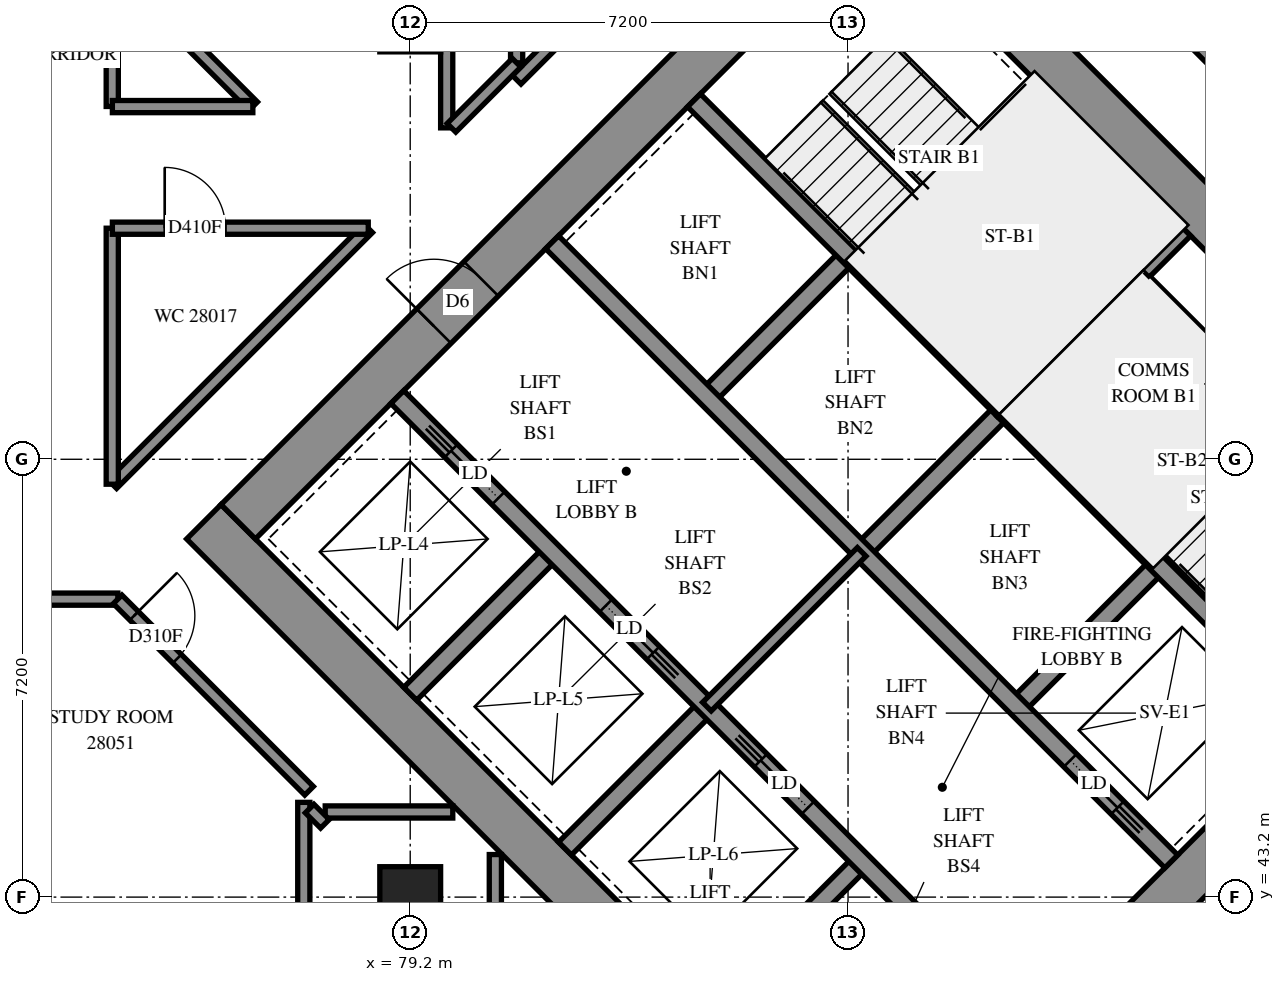
"""IFC4 building model, lengths in metres.
Left out: names, types, materials, properties, quantities, classifications, styles, units other than length and angle.
Written with IfcOpenShell. Run it as: python <this file> out.ifc"""

import sys

from ifc_helpers import new_model, si_unit, direction, frame, frame_2d, origin, origin_2d, place, context, subcontext, project, spatial, rectangle, extrude, element, fill, save


model = new_model("IFC4")
c1 = context("Model", 3, precision=1e-05, world=origin(), true_north=direction((0.0, 1.0)))
c2 = subcontext(c1, "Body", "Model", "MODEL_VIEW")
j1 = project(units=[si_unit("LENGTHUNIT", "METRE"), si_unit("PLANEANGLEUNIT", "RADIAN")], contexts=[c1])
p1 = place(None, origin())
s1 = spatial("IfcSite", under=j1, at=p1, CompositionType="ELEMENT")
p2 = place(p1, origin())
s2 = spatial("IfcBuilding", under=s1, at=p2, CompositionType="ELEMENT")
p3 = place(p2, frame((0.0, 0.0, 105.0)))
s3 = spatial("IfcBuildingStorey", under=s2, at=p3, CompositionType="ELEMENT", Elevation=105.0)
p4 = place(p3, frame((79.2, 43.2, 0.0), z_axis=(0.0, 0.0, 1.0), x_axis=(1.0, 0.0, 0.0)))
e1 = element("IfcColumn", 1, at=p4, inside=s3, PredefinedType="COLUMN", context=c2, shape_type="SweptSolid", body=[
    extrude(rectangle(XDim=1.0, YDim=1.0, at=origin_2d()), origin(), (0.0, 0.0, 1.0), 3.1),
])
p5 = place(p3, frame((75.806, 49.373, -0.3), z_axis=(0.0, 0.0, 1.0), x_axis=(0.7071067812, -0.7071067812, 0.0)))
e2 = element("IfcWall", 2, at=p5, inside=s3, PredefinedType="SHEAR", context=c2, shape_type="SweptSolid", body=[
    extrude(rectangle(XDim=16.0, YDim=0.8, at=frame_2d((8.0, 0.0))), origin(), (0.0, 0.0, 1.0), 2.7),
])
p6 = place(p3, frame((86.554, 60.121, -0.3), z_axis=(0.0, 0.0, 1.0), x_axis=(0.7071067812, -0.7071067812, 0.0)))
e3 = element("IfcWall", 3, at=p6, inside=s3, PredefinedType="SHEAR", context=c2, shape_type="SweptSolid", body=[
    extrude(rectangle(XDim=16.0, YDim=0.8, at=frame_2d((8.0, 0.0))), origin(), (0.0, 0.0, 1.0), 2.7),
])
p7 = place(p6, frame((10.8, 0.0, 0.3)))
e4 = element("IfcOpeningElement", 4, at=p7, cuts=e3, PredefinedType="OPENING", context=c2, shape_type="SweptSolid", body=[
    extrude(rectangle(XDim=0.8, YDim=2.1, at=frame_2d((0.4, 1.05))), frame((0.0, 0.41, 0.0), z_axis=(0.0, -1.0, 0.0), x_axis=(1.0, 0.0, 0.0)), (0.0, 0.0, 1.0), 0.82),
])
p8 = place(p3, frame((76.372, 49.373, -0.3), z_axis=(0.0, 0.0, 1.0), x_axis=(0.7071067812, 0.7071067812, 0.0)))
e5 = element("IfcWall", 5, at=p8, inside=s3, PredefinedType="SHEAR", context=c2, shape_type="SweptSolid", body=[
    extrude(rectangle(XDim=14.4, YDim=0.8, at=frame_2d((7.2, 0.0))), origin(), (0.0, 0.0, 1.0), 2.7),
])
p9 = place(p8, frame((4.55, 0.0, 0.3)))
e6 = element("IfcOpeningElement", 6, at=p9, cuts=e5, PredefinedType="OPENING", context=c2, shape_type="SweptSolid", body=[
    extrude(rectangle(XDim=1.1, YDim=2.1, at=frame_2d((0.55, 1.05))), frame((0.0, 0.41, 0.0), z_axis=(0.0, -1.0, 0.0), x_axis=(1.0, 0.0, 0.0)), (0.0, 0.0, 1.0), 0.82),
])
p10 = place(p8, frame((11.35, 0.0, 0.3)))
e7 = element("IfcOpeningElement", 7, at=p10, cuts=e5, PredefinedType="OPENING", context=c2, shape_type="SweptSolid", body=[
    extrude(rectangle(XDim=1.1, YDim=2.1, at=frame_2d((0.55, 1.05))), frame((0.0, 0.41, 0.0), z_axis=(0.0, -1.0, 0.0), x_axis=(1.0, 0.0, 0.0)), (0.0, 0.0, 1.0), 0.82),
])
p11 = place(p3, frame((87.12, 38.625, -0.3), z_axis=(0.0, 0.0, 1.0), x_axis=(0.7071067812, 0.7071067812, 0.0)))
e8 = element("IfcWall", 8, at=p11, inside=s3, PredefinedType="SHEAR", context=c2, shape_type="SweptSolid", body=[
    extrude(rectangle(XDim=14.4, YDim=0.8, at=frame_2d((7.2, 0.0))), origin(), (0.0, 0.0, 1.0), 2.7),
])
p12 = place(p11, frame((4.55, 0.0, 0.3)))
e9 = element("IfcOpeningElement", 9, at=p12, cuts=e8, PredefinedType="OPENING", context=c2, shape_type="SweptSolid", body=[
    extrude(rectangle(XDim=1.1, YDim=2.1, at=frame_2d((0.55, 1.05))), frame((0.0, 0.41, 0.0), z_axis=(0.0, -1.0, 0.0), x_axis=(1.0, 0.0, 0.0)), (0.0, 0.0, 1.0), 0.82),
])
p13 = place(p11, frame((11.35, 0.0, 0.3)))
e10 = element("IfcOpeningElement", 10, at=p13, cuts=e8, PredefinedType="OPENING", context=c2, shape_type="SweptSolid", body=[
    extrude(rectangle(XDim=1.1, YDim=2.1, at=frame_2d((0.55, 1.05))), frame((0.0, 0.41, 0.0), z_axis=(0.0, -1.0, 0.0), x_axis=(1.0, 0.0, 0.0)), (0.0, 0.0, 1.0), 0.82),
])
for number, where, z_axis, x_axis in (
    (11, (79.2, 46.544, 0.0), (0.0, 0.0, 1.0), (0.707, 0.707, 0.0)),
    (12, (84.079, 51.423, 0.0), (0.0, 0.0, 1.0), (0.707, 0.707, 0.0)),
):
    element("IfcWall", number, at=place(p3, frame(where, z_axis=z_axis, x_axis=x_axis)), inside=s3, PredefinedType="SOLIDWALL", context=c2, shape_type="SweptSolid", body=[
        extrude(rectangle(XDim=3.3, YDim=0.3, at=frame_2d((1.65, 0.0))), origin(), (0.0, 0.0, 1.0), 3.1),
    ])
p14 = place(p3, frame((81.746, 43.999, 0.0), z_axis=(0.0, 0.0, 1.0), x_axis=(0.7071067812, 0.7071067812, 0.0)))
e13 = element("IfcWall", 13, at=p14, inside=s3, PredefinedType="SOLIDWALL", context=c2, shape_type="SweptSolid", body=[
    extrude(rectangle(XDim=3.3, YDim=0.3, at=frame_2d((1.65, 0.0))), origin(), (0.0, 0.0, 1.0), 3.1),
])
p15 = place(p3, frame((86.625, 48.878, 0.0), z_axis=(0.0, 0.0, 1.0), x_axis=(0.7071067812, 0.7071067812, 0.0)))
e14 = element("IfcWall", 14, at=p15, inside=s3, PredefinedType="SOLIDWALL", context=c2, shape_type="SweptSolid", body=[
    extrude(rectangle(XDim=3.3, YDim=0.3, at=frame_2d((1.65, 0.0))), origin(), (0.0, 0.0, 1.0), 3.1),
])
p16 = place(p3, frame((84.291, 41.453, 0.0), z_axis=(0.0, 0.0, 1.0), x_axis=(0.7071067812, 0.7071067812, 0.0)))
e15 = element("IfcWall", 15, at=p16, inside=s3, PredefinedType="SOLIDWALL", context=c2, shape_type="SweptSolid", body=[
    extrude(rectangle(XDim=3.3, YDim=0.3, at=frame_2d((1.65, 0.0))), origin(), (0.0, 0.0, 1.0), 3.1),
])
p17 = place(p3, frame((89.17, 46.332, 0.0), z_axis=(0.0, 0.0, 1.0), x_axis=(0.7071067812, 0.7071067812, 0.0)))
e16 = element("IfcWall", 16, at=p17, inside=s3, PredefinedType="SOLIDWALL", context=c2, shape_type="SweptSolid", body=[
    extrude(rectangle(XDim=3.3, YDim=0.3, at=frame_2d((1.65, 0.0))), origin(), (0.0, 0.0, 1.0), 3.1),
])
p18 = place(p3, frame((78.988, 51.423, 0.0), z_axis=(0.0, 0.0, 1.0), x_axis=(0.7071067812, -0.7071067812, 0.0)))
e17 = element("IfcWall", 17, at=p18, inside=s3, PredefinedType="SOLIDWALL", context=c2, shape_type="SweptSolid", body=[
    extrude(rectangle(XDim=14.4, YDim=0.3, at=frame_2d((7.2, 0.0))), origin(), (0.0, 0.0, 1.0), 3.1),
])
p19 = place(p18, frame((1.25, 0.0, 0.0)))
e18 = element("IfcOpeningElement", 18, at=p19, cuts=e17, PredefinedType="OPENING", context=c2, shape_type="SweptSolid", body=[
    extrude(rectangle(XDim=1.1, YDim=2.1, at=frame_2d((0.55, 1.05))), frame((0.0, 0.16, 0.0), z_axis=(0.0, -1.0, 0.0), x_axis=(1.0, 0.0, 0.0)), (0.0, 0.0, 1.0), 0.32),
])
p20 = place(p18, frame((4.85, 0.0, 0.0)))
e19 = element("IfcOpeningElement", 19, at=p20, cuts=e17, PredefinedType="OPENING", context=c2, shape_type="SweptSolid", body=[
    extrude(rectangle(XDim=1.1, YDim=2.1, at=frame_2d((0.55, 1.05))), frame((0.0, 0.16, 0.0), z_axis=(0.0, -1.0, 0.0), x_axis=(1.0, 0.0, 0.0)), (0.0, 0.0, 1.0), 0.32),
])
p21 = place(p18, frame((8.45, 0.0, 0.0)))
e20 = element("IfcOpeningElement", 20, at=p21, cuts=e17, PredefinedType="OPENING", context=c2, shape_type="SweptSolid", body=[
    extrude(rectangle(XDim=1.1, YDim=2.1, at=frame_2d((0.55, 1.05))), frame((0.0, 0.16, 0.0), z_axis=(0.0, -1.0, 0.0), x_axis=(1.0, 0.0, 0.0)), (0.0, 0.0, 1.0), 0.32),
])
p22 = place(p18, frame((12.05, 0.0, 0.0)))
e21 = element("IfcOpeningElement", 21, at=p22, cuts=e17, PredefinedType="OPENING", context=c2, shape_type="SweptSolid", body=[
    extrude(rectangle(XDim=1.1, YDim=2.1, at=frame_2d((0.55, 1.05))), frame((0.0, 0.16, 0.0), z_axis=(0.0, -1.0, 0.0), x_axis=(1.0, 0.0, 0.0)), (0.0, 0.0, 1.0), 0.32),
])
p23 = place(p3, frame((81.534, 53.969, 0.0), z_axis=(0.0, 0.0, 1.0), x_axis=(0.707103309, -0.7071102534, 0.0)))
e22 = element("IfcWall", 22, at=p23, inside=s3, PredefinedType="SOLIDWALL", context=c2, shape_type="SweptSolid", body=[
    extrude(rectangle(XDim=14.4, YDim=0.3, at=frame_2d((7.2, 0.0))), origin(), (0.0, 0.0, 1.0), 3.1),
])
p24 = place(p23, frame((12.05, 0.0, 0.0)))
e23 = element("IfcOpeningElement", 23, at=p24, cuts=e22, PredefinedType="OPENING", context=c2, shape_type="SweptSolid", body=[
    extrude(rectangle(XDim=1.1, YDim=2.1, at=frame_2d((0.55, 1.05))), frame((0.0, 0.16, 0.0), z_axis=(0.0, -1.0, 0.0), x_axis=(1.0, 0.0, 0.0)), (0.0, 0.0, 1.0), 0.32),
])
for number, where, z_axis, x_axis in (
    (24, (83.867, 56.302, 0.0), (0.0, 0.0, 1.0), (0.707, -0.707, 0.0)),
    (25, (88.958, 51.211, 0.0), (0.0, 0.0, 1.0), (0.707, -0.707, 0.0)),
):
    element("IfcWall", number, at=place(p3, frame(where, z_axis=z_axis, x_axis=x_axis)), inside=s3, PredefinedType="SOLIDWALL", context=c2, shape_type="SweptSolid", body=[
        extrude(rectangle(XDim=7.2, YDim=0.3, at=frame_2d((3.6, 0.0))), origin(), (0.0, 0.0, 1.0), 3.1),
    ])
p25 = place(p3, frame((88.958, 51.211, 0.0), z_axis=(0.0, 0.0, 1.0), x_axis=(0.7071067812, 0.7071067812, 0.0)))
e26 = element("IfcWall", 26, at=p25, inside=s3, PredefinedType="SOLIDWALL", context=c2, shape_type="SweptSolid", body=[
    extrude(rectangle(XDim=4.2, YDim=0.3, at=frame_2d((2.1, 0.0))), origin(), (0.0, 0.0, 1.0), 3.1),
])
p26 = place(p3, frame((91.313, 53.354, 0.0), z_axis=(0.0, 0.0, 1.0), x_axis=(0.7071067812, -0.7071067812, 0.0)))
e27 = element("IfcWall", 27, at=p26, inside=s3, PredefinedType="PARTITIONING", context=c2, shape_type="SweptSolid", body=[
    extrude(rectangle(XDim=5.95, YDim=0.15, at=frame_2d((2.975, 0.0))), origin(), (0.0, 0.0, 1.0), 3.1),
])
p27 = place(p3, frame((84.079, 46.332, 0.0), z_axis=(0.0, 0.0, 1.0), x_axis=(0.7071067812, 0.7071067812, 0.0)))
e28 = element("IfcWall", 28, at=p27, inside=s3, PredefinedType="PARTITIONING", context=c2, shape_type="SweptSolid", body=[
    extrude(rectangle(XDim=3.6, YDim=0.2, at=frame_2d((1.8, 0.0))), origin(), (0.0, 0.0, 1.0), 3.1),
])
p28 = place(p3, frame((55.3, 48.1, 0.0), z_axis=(0.0, 0.0, 1.0), x_axis=(1.0, 0.0, 0.0)))
e29 = element("IfcWall", 29, at=p28, inside=s3, PredefinedType="PARTITIONING", context=c2, shape_type="SweptSolid", body=[
    extrude(rectangle(XDim=19.092, YDim=0.2, at=frame_2d((9.546, 0.0))), origin(), (0.0, 0.0, 1.0), 3.1),
])
p29 = place(p28, frame((4.6, 0.0, 0.0)))
e30 = element("IfcOpeningElement", 30, at=p29, cuts=e29, PredefinedType="OPENING", context=c2, shape_type="SweptSolid", body=[
    extrude(rectangle(XDim=0.9, YDim=2.1, at=frame_2d((0.45, 1.05))), frame((0.0, 0.11, 0.0), z_axis=(0.0, -1.0, 0.0), x_axis=(1.0, 0.0, 0.0)), (0.0, 0.0, 1.0), 0.22),
])
p30 = place(p28, frame((8.239, 0.0, 0.0)))
e31 = element("IfcOpeningElement", 31, at=p30, cuts=e29, PredefinedType="OPENING", context=c2, shape_type="SweptSolid", body=[
    extrude(rectangle(XDim=0.9, YDim=2.1, at=frame_2d((0.45, 1.05))), frame((0.0, 0.11, 0.0), z_axis=(0.0, -1.0, 0.0), x_axis=(1.0, 0.0, 0.0)), (0.0, 0.0, 1.0), 0.22),
])
p31 = place(p28, frame((13.5, 0.0, 0.0)))
e32 = element("IfcOpeningElement", 32, at=p31, cuts=e29, PredefinedType="OPENING", context=c2, shape_type="SweptSolid", body=[
    extrude(rectangle(XDim=0.9, YDim=2.1, at=frame_2d((0.45, 1.05))), frame((0.0, 0.11, 0.0), z_axis=(0.0, -1.0, 0.0), x_axis=(1.0, 0.0, 0.0)), (0.0, 0.0, 1.0), 0.22),
])
p32 = place(p3, frame((87.894, 61.461, 0.0), z_axis=(0.0, 0.0, 1.0), x_axis=(0.7071067812, -0.7071067812, 0.0)))
e33 = element("IfcWall", 33, at=p32, inside=s3, PredefinedType="PARTITIONING", context=c2, shape_type="SweptSolid", body=[
    extrude(rectangle(XDim=10.428, YDim=0.2, at=frame_2d((5.214, 0.0))), origin(), (0.0, 0.0, 1.0), 3.1),
])
p33 = place(p32, frame((6.39, 0.0, 0.0)))
e34 = element("IfcOpeningElement", 34, at=p33, cuts=e33, PredefinedType="OPENING", context=c2, shape_type="SweptSolid", body=[
    extrude(rectangle(XDim=0.9, YDim=2.1, at=frame_2d((0.45, 1.05))), frame((0.0, 0.11, 0.0), z_axis=(0.0, -1.0, 0.0), x_axis=(1.0, 0.0, 0.0)), (0.0, 0.0, 1.0), 0.22),
])
p34 = place(p3, frame((80.951, 56.641, 0.0), z_axis=(0.0, 0.0, 1.0), x_axis=(0.7071067812, 0.7071067812, 0.0)))
e35 = element("IfcWall", 35, at=p34, inside=s3, PredefinedType="PARTITIONING", context=c2, shape_type="SweptSolid", body=[
    extrude(rectangle(XDim=8.321, YDim=0.2, at=frame_2d((4.161, 0.0))), origin(), (0.0, 0.0, 1.0), 3.1),
])
p35 = place(p34, frame((0.816, 0.0, 0.0)))
e36 = element("IfcOpeningElement", 36, at=p35, cuts=e35, PredefinedType="OPENING", context=c2, shape_type="SweptSolid", body=[
    extrude(rectangle(XDim=1.0, YDim=2.1, at=frame_2d((0.5, 1.05))), frame((0.0, 0.11, 0.0), z_axis=(0.0, -1.0, 0.0), x_axis=(1.0, 0.0, 0.0)), (0.0, 0.0, 1.0), 0.22),
])
p36 = place(p3, frame((74.301, 49.991, 0.0), z_axis=(0.0, 0.0, 1.0), x_axis=(0.7071067812, 0.7071067812, 0.0)))
e37 = element("IfcWall", 37, at=p36, inside=s3, PredefinedType="PARTITIONING", context=c2, shape_type="SweptSolid", body=[
    extrude(rectangle(XDim=5.951, YDim=0.2, at=frame_2d((2.975, 0.0))), origin(), (0.0, 0.0, 1.0), 3.1),
])
p37 = place(p3, frame((74.388, 48.096, 0.0), z_axis=(0.0, 0.0, 1.0), x_axis=(0.7071067812, -0.7071067812, 0.0)))
e38 = element("IfcWall", 38, at=p37, inside=s3, PredefinedType="PARTITIONING", context=c2, shape_type="SweptSolid", body=[
    extrude(rectangle(XDim=4.452, YDim=0.2, at=frame_2d((2.226, 0.0))), origin(), (0.0, 0.0, 1.0), 3.1),
])
p38 = place(p37, frame((0.382, 0.0, 0.0)))
e39 = element("IfcOpeningElement", 39, at=p38, cuts=e38, PredefinedType="OPENING", context=c2, shape_type="SweptSolid", body=[
    extrude(rectangle(XDim=1.0, YDim=2.1, at=frame_2d((0.5, 1.05))), frame((0.0, 0.11, 0.0), z_axis=(0.0, -1.0, 0.0), x_axis=(1.0, 0.0, 0.0)), (0.0, 0.0, 1.0), 0.22),
])
p39 = place(p3, frame((74.3, 49.99, 0.0), z_axis=(0.0, 0.0, 1.0), x_axis=(0.0, 1.0, 0.0)))
e40 = element("IfcWall", 40, at=p39, inside=s3, PredefinedType="PARTITIONING", context=c2, shape_type="SweptSolid", body=[
    extrude(rectangle(XDim=4.21, YDim=0.2, at=frame_2d((2.105, 0.0))), origin(), (0.0, 0.0, 1.0), 3.1),
])
p40 = place(p3, frame((74.302, 54.2, 0.0), z_axis=(0.0, 0.0, 1.0), x_axis=(1.0, 0.0, 0.0)))
e41 = element("IfcWall", 41, at=p40, inside=s3, PredefinedType="PARTITIONING", context=c2, shape_type="SweptSolid", body=[
    extrude(rectangle(XDim=4.208, YDim=0.2, at=frame_2d((2.104, 0.0))), origin(), (0.0, 0.0, 1.0), 3.1),
])
p41 = place(p40, frame((0.86, 0.0, 0.0)))
e42 = element("IfcOpeningElement", 42, at=p41, cuts=e41, PredefinedType="OPENING", context=c2, shape_type="SweptSolid", body=[
    extrude(rectangle(XDim=1.0, YDim=2.1, at=frame_2d((0.5, 1.05))), frame((0.0, 0.11, 0.0), z_axis=(0.0, -1.0, 0.0), x_axis=(1.0, 0.0, 0.0)), (0.0, 0.0, 1.0), 0.22),
])
p42 = place(p3, frame((77.45, 40.984, 0.0), z_axis=(0.0, 0.0, 1.0), x_axis=(0.0, 1.0, 0.0)))
e43 = element("IfcWall", 43, at=p42, inside=s3, PredefinedType="PARTITIONING", context=c2, shape_type="SweptSolid", body=[
    extrude(rectangle(XDim=3.774, YDim=0.2, at=frame_2d((1.887, 0.0))), origin(), (0.0, 0.0, 1.0), 3.1),
])
p43 = place(p3, frame((79.8, 55.85, 0.0), z_axis=(0.0, 0.0, 1.0), x_axis=(0.0, 1.0, 0.0)))
e44 = element("IfcWall", 44, at=p43, inside=s3, PredefinedType="PARTITIONING", context=c2, shape_type="SweptSolid", body=[
    extrude(rectangle(XDim=3.5, YDim=0.2, at=frame_2d((1.75, 0.0))), origin(), (0.0, 0.0, 1.0), 3.1),
])
p44 = place(p3, frame((74.305, 58.517, 0.0), z_axis=(0.0, 0.0, 1.0), x_axis=(0.7071067812, -0.7071067812, 0.0)))
e45 = element("IfcWall", 45, at=p44, inside=s3, PredefinedType="PARTITIONING", context=c2, shape_type="SweptSolid", body=[
    extrude(rectangle(XDim=3.27, YDim=0.2, at=frame_2d((1.635, 0.0))), origin(), (0.0, 0.0, 1.0), 3.1),
])
for number, where, z_axis, x_axis in (
    (46, (74.3, 56.202, 0.0), (0.0, 0.0, 1.0), (0.0, 1.0, 0.0)),
    (47, (74.302, 56.2, 0.0), (0.0, 0.0, 1.0), (1.0, 0.0, 0.0)),
):
    element("IfcWall", number, at=place(p3, frame(where, z_axis=z_axis, x_axis=x_axis)), inside=s3, PredefinedType="PARTITIONING", context=c2, shape_type="SweptSolid", body=[
        extrude(rectangle(XDim=2.31, YDim=0.2, at=frame_2d((1.155, 0.0))), origin(), (0.0, 0.0, 1.0), 3.1),
    ])
for number, where, z_axis, x_axis in (
    (48, (77.802, 44.6, 0.0), (0.0, 0.0, 1.0), (1.0, 0.0, 0.0)),
    (49, (80.6, 41.802, 0.0), (0.0, 0.0, 1.0), (0.0, 1.0, 0.0)),
):
    element("IfcWall", number, at=place(p3, frame(where, z_axis=z_axis, x_axis=x_axis)), inside=s3, PredefinedType="PARTITIONING", context=c2, shape_type="SweptSolid", body=[
        extrude(rectangle(XDim=2.098, YDim=0.2, at=frame_2d((1.049, 0.0))), origin(), (0.0, 0.0, 1.0), 3.1),
    ])
p45 = place(p3, frame((80.95, 56.92, 0.0), z_axis=(0.0, 0.0, 1.0), x_axis=(0.0, 1.0, 0.0)))
e50 = element("IfcWall", 50, at=p45, inside=s3, PredefinedType="PARTITIONING", context=c2, shape_type="SweptSolid", body=[
    extrude(rectangle(XDim=1.556, YDim=0.2, at=frame_2d((0.778, 0.0))), origin(), (0.0, 0.0, 1.0), 3.1),
])
p46 = place(p3, frame((79.879, 55.851, 0.0), z_axis=(0.0, 0.0, 1.0), x_axis=(0.7071067812, 0.7071067812, 0.0)))
e51 = element("IfcWall", 51, at=p46, inside=s3, PredefinedType="PARTITIONING", context=c2, shape_type="SweptSolid", body=[
    extrude(rectangle(XDim=1.513, YDim=0.2, at=frame_2d((0.757, 0.0))), origin(), (0.0, 0.0, 1.0), 3.1),
])
p47 = place(p3, frame((77.546, 44.656, 0.0), z_axis=(0.0, 0.0, 1.0), x_axis=(0.7071067812, -0.7071067812, 0.0)))
e52 = element("IfcWall", 52, at=p47, inside=s3, PredefinedType="PARTITIONING", context=c2, shape_type="SweptSolid", body=[
    extrude(rectangle(XDim=0.355, YDim=0.2, at=frame_2d((0.177, 0.0))), origin(), (0.0, 0.0, 1.0), 3.1),
])
p48 = place(p9, origin())
e53 = element("IfcDoor", 53, at=p48, inside=s3, OperationType="DOUBLE_DOOR_SINGLE_SWING", PredefinedType="DOOR", context=c2, shape_type="SweptSolid", body=[
    extrude(rectangle(XDim=1.1, YDim=2.1, at=frame_2d((0.55, 1.05))), frame((0.0, 0.025, 0.0), z_axis=(0.0, -1.0, 0.0), x_axis=(1.0, 0.0, 0.0)), (0.0, 0.0, 1.0), 0.05),
])
fill(e6, e53)
p49 = place(p19, origin())
e54 = element("IfcDoor", 54, at=p49, inside=s3, OperationType="SLIDING_TO_LEFT", PredefinedType="DOOR", context=c2, shape_type="SweptSolid", body=[
    extrude(rectangle(XDim=1.1, YDim=2.1, at=frame_2d((0.55, 1.05))), frame((0.0, 0.025, 0.0), z_axis=(0.0, -1.0, 0.0), x_axis=(1.0, 0.0, 0.0)), (0.0, 0.0, 1.0), 0.05),
])
fill(e18, e54)
p50 = place(p20, origin())
e55 = element("IfcDoor", 55, at=p50, inside=s3, OperationType="SLIDING_TO_RIGHT", PredefinedType="DOOR", context=c2, shape_type="SweptSolid", body=[
    extrude(rectangle(XDim=1.1, YDim=2.1, at=frame_2d((0.55, 1.05))), frame((0.0, 0.025, 0.0), z_axis=(0.0, -1.0, 0.0), x_axis=(1.0, 0.0, 0.0)), (0.0, 0.0, 1.0), 0.05),
])
fill(e19, e55)
p51 = place(p21, origin())
e56 = element("IfcDoor", 56, at=p51, inside=s3, OperationType="SLIDING_TO_LEFT", PredefinedType="DOOR", context=c2, shape_type="SweptSolid", body=[
    extrude(rectangle(XDim=1.1, YDim=2.1, at=frame_2d((0.55, 1.05))), frame((0.0, 0.025, 0.0), z_axis=(0.0, -1.0, 0.0), x_axis=(1.0, 0.0, 0.0)), (0.0, 0.0, 1.0), 0.05),
])
fill(e20, e56)
p52 = place(p24, origin())
e57 = element("IfcDoor", 57, at=p52, inside=s3, OperationType="SLIDING_TO_RIGHT", PredefinedType="DOOR", context=c2, shape_type="SweptSolid", body=[
    extrude(rectangle(XDim=1.1, YDim=2.1, at=frame_2d((0.55, 1.05))), frame((0.0, 0.025, 0.0), z_axis=(0.0, -1.0, 0.0), x_axis=(1.0, 0.0, 0.0)), (0.0, 0.0, 1.0), 0.05),
])
fill(e23, e57)
p53 = place(p41, origin())
e58 = element("IfcDoor", 58, at=p53, inside=s3, OperationType="SINGLE_SWING_RIGHT", PredefinedType="DOOR", context=c2, shape_type="SweptSolid", body=[
    extrude(rectangle(XDim=1.0, YDim=2.1, at=frame_2d((0.5, 1.05))), frame((0.0, 0.025, 0.0), z_axis=(0.0, -1.0, 0.0), x_axis=(1.0, 0.0, 0.0)), (0.0, 0.0, 1.0), 0.05),
])
fill(e42, e58)
p54 = place(p38, origin())
e59 = element("IfcDoor", 59, at=p54, inside=s3, OperationType="SINGLE_SWING_LEFT", PredefinedType="DOOR", context=c2, shape_type="SweptSolid", body=[
    extrude(rectangle(XDim=1.0, YDim=2.1, at=frame_2d((0.5, 1.05))), frame((0.0, 0.025, 0.0), z_axis=(0.0, -1.0, 0.0), x_axis=(1.0, 0.0, 0.0)), (0.0, 0.0, 1.0), 0.05),
])
fill(e39, e59)
save(model, sys.argv[1])
